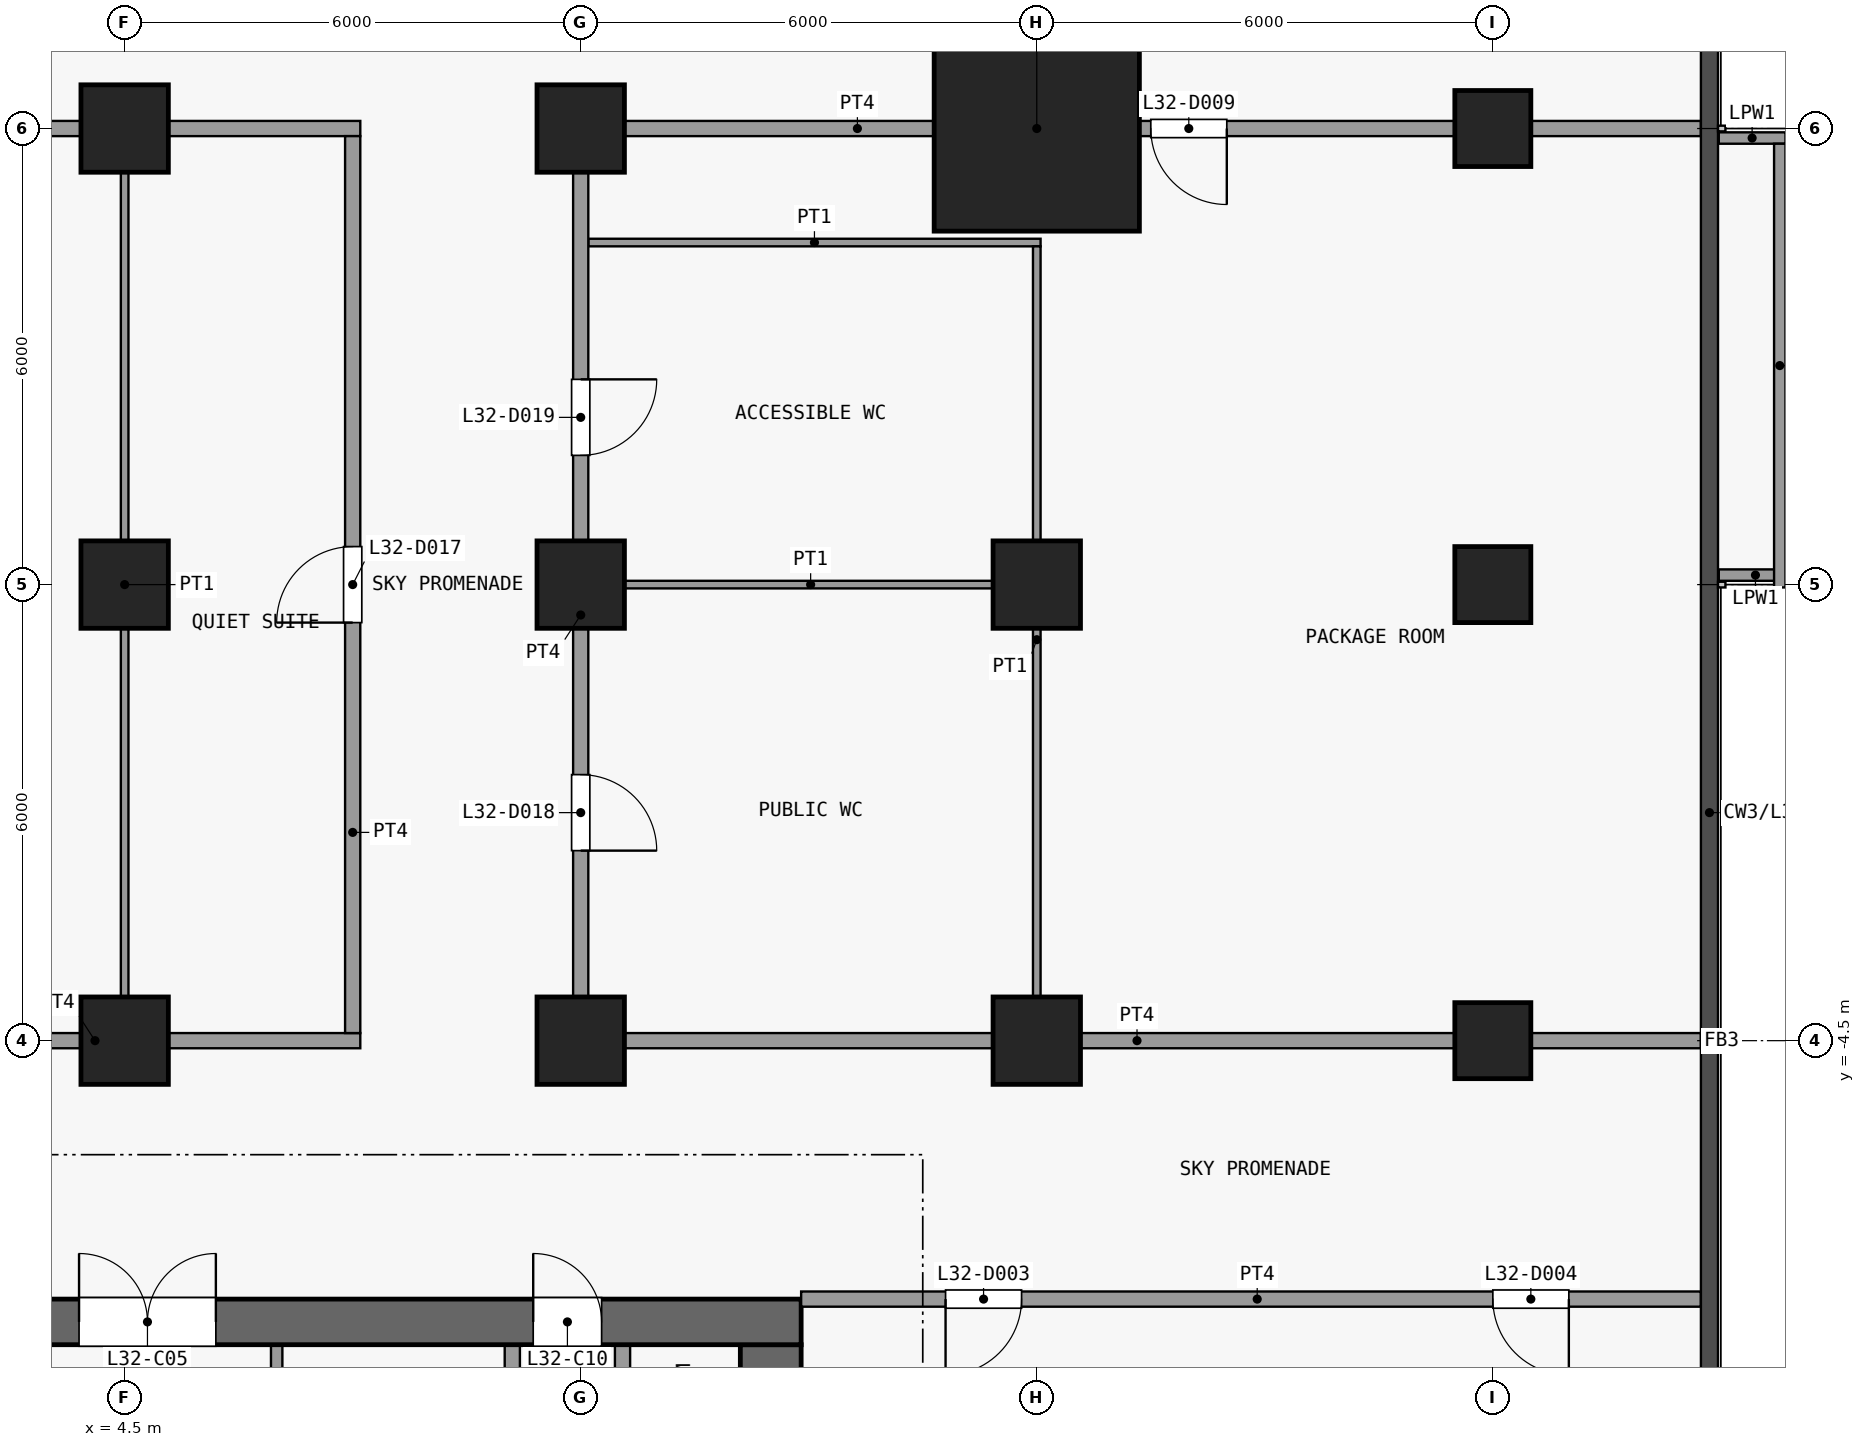
"""IFC4 building model, lengths in metres.
Left out: names, types, materials, properties, quantities, classifications, styles, units other than length and angle.
Written with IfcOpenShell. Run it as: python <this file> out.ifc"""

import sys

from ifc_helpers import new_model, si_unit, direction, frame, frame_2d, origin, origin_2d, place, context, subcontext, project, spatial, rectangle, extrude, element, fill, save


model = new_model("IFC4")
c1 = context("Model", 3, precision=1e-05, world=origin(), true_north=direction((0.0, 1.0)))
c2 = subcontext(c1, "Body", "Model", "MODEL_VIEW")
j1 = project(units=[si_unit("LENGTHUNIT", "METRE"), si_unit("PLANEANGLEUNIT", "RADIAN")], contexts=[c1])
p1 = place(None, origin())
s1 = spatial("IfcSite", under=j1, at=p1, CompositionType="ELEMENT")
p2 = place(p1, origin())
s2 = spatial("IfcBuilding", under=s1, at=p2, CompositionType="ELEMENT")
p3 = place(p2, frame((0.0, 0.0, 127.9)))
s3 = spatial("IfcBuildingStorey", under=s2, at=p3, CompositionType="ELEMENT", Elevation=127.9)
for number, where, z_axis, x_axis in (
    (1, (4.5, -4.5, 0.0), (0.0, 0.0, 1.0), (1.0, 0.0, 0.0)),
    (2, (4.5, 1.5, 0.0), (0.0, 0.0, 1.0), (1.0, 0.0, 0.0)),
    (3, (4.5, 7.5, 0.0), (0.0, 0.0, 1.0), (1.0, 0.0, 0.0)),
    (4, (10.5, -4.5, 0.0), (0.0, 0.0, 1.0), (1.0, 0.0, 0.0)),
    (5, (10.5, 1.5, 0.0), (0.0, 0.0, 1.0), (1.0, 0.0, 0.0)),
    (6, (10.5, 7.5, 0.0), (0.0, 0.0, 1.0), (1.0, 0.0, 0.0)),
    (7, (16.5, -4.5, 0.0), (0.0, 0.0, 1.0), (1.0, 0.0, 0.0)),
    (8, (16.5, 1.5, 0.0), (0.0, 0.0, 1.0), (1.0, 0.0, 0.0)),
):
    element("IfcColumn", number, at=place(p3, frame(where, z_axis=z_axis, x_axis=x_axis)), inside=s3, PredefinedType="COLUMN", context=c2, shape_type="SweptSolid", body=[
        extrude(rectangle(XDim=1.15, YDim=1.15, at=origin_2d()), origin(), (0.0, 0.0, 1.0), 6.0),
    ])
p4 = place(p3, frame((16.5, 7.5, 0.0), z_axis=(0.0, 0.0, 1.0), x_axis=(1.0, 0.0, 0.0)))
e9 = element("IfcColumn", 9, at=p4, inside=s3, PredefinedType="COLUMN", context=c2, shape_type="SweptSolid", body=[
    extrude(rectangle(XDim=2.7, YDim=2.7, at=origin_2d()), origin(), (0.0, 0.0, 1.0), 6.0),
])
for number, where, z_axis, x_axis in (
    (10, (22.5, -4.5, 0.0), (0.0, 0.0, 1.0), (1.0, 0.0, 0.0)),
    (11, (22.5, 1.5, 0.0), (0.0, 0.0, 1.0), (1.0, 0.0, 0.0)),
    (12, (22.5, 7.5, 0.0), (0.0, 0.0, 1.0), (1.0, 0.0, 0.0)),
):
    element("IfcColumn", number, at=place(p3, frame(where, z_axis=z_axis, x_axis=x_axis)), inside=s3, PredefinedType="COLUMN", context=c2, shape_type="SweptSolid", body=[
        extrude(rectangle(XDim=1.0, YDim=1.0, at=origin_2d()), origin(), (0.0, 0.0, 1.0), 6.0),
    ])
p5 = place(p3, frame((-13.4, -8.2, 0.0), z_axis=(0.0, 0.0, 1.0), x_axis=(1.0, 0.0, 0.0)))
e13 = element("IfcWall", 13, at=p5, inside=s3, PredefinedType="SHEAR", context=c2, shape_type="SweptSolid", body=[
    extrude(rectangle(XDim=26.8, YDim=0.6, at=frame_2d((13.4, 0.0))), origin(), (0.0, 0.0, 1.0), 5.7),
])
p6 = place(p5, frame((7.7, 0.0, 0.0)))
e14 = element("IfcOpeningElement", 14, at=p6, cuts=e13, PredefinedType="OPENING", context=c2, shape_type="SweptSolid", body=[
    extrude(rectangle(XDim=1.8, YDim=2.1, at=frame_2d((0.9, 1.05))), frame((0.0, 0.31, 0.0), z_axis=(0.0, -1.0, 0.0), x_axis=(1.0, 0.0, 0.0)), (0.0, 0.0, 1.0), 0.62),
])
p7 = place(p5, frame((17.3, 0.0, 0.0)))
e15 = element("IfcOpeningElement", 15, at=p7, cuts=e13, PredefinedType="OPENING", context=c2, shape_type="SweptSolid", body=[
    extrude(rectangle(XDim=1.8, YDim=2.1, at=frame_2d((0.9, 1.05))), frame((0.0, 0.31, 0.0), z_axis=(0.0, -1.0, 0.0), x_axis=(1.0, 0.0, 0.0)), (0.0, 0.0, 1.0), 0.62),
])
p8 = place(p5, frame((2.625, 0.0, 0.0)))
e16 = element("IfcOpeningElement", 16, at=p8, cuts=e13, PredefinedType="OPENING", context=c2, shape_type="SweptSolid", body=[
    extrude(rectangle(XDim=0.9, YDim=2.1, at=frame_2d((0.45, 1.05))), frame((0.0, 0.31, 0.0), z_axis=(0.0, -1.0, 0.0), x_axis=(1.0, 0.0, 0.0)), (0.0, 0.0, 1.0), 0.62),
])
p9 = place(p5, frame((23.275, 0.0, 0.0)))
e17 = element("IfcOpeningElement", 17, at=p9, cuts=e13, PredefinedType="OPENING", context=c2, shape_type="SweptSolid", body=[
    extrude(rectangle(XDim=0.9, YDim=2.1, at=frame_2d((0.45, 1.05))), frame((0.0, 0.31, 0.0), z_axis=(0.0, -1.0, 0.0), x_axis=(1.0, 0.0, 0.0)), (0.0, 0.0, 1.0), 0.62),
])
p10 = place(p3, frame((13.0, -24.6, 0.0), z_axis=(0.0, 0.0, 1.0), x_axis=(0.0, 1.0, 0.0)))
e18 = element("IfcWall", 18, at=p10, inside=s3, PredefinedType="SHEAR", context=c2, shape_type="SweptSolid", body=[
    extrude(rectangle(XDim=16.1, YDim=0.8, at=frame_2d((8.05, 0.0))), origin(), (0.0, 0.0, 1.0), 5.7),
])
p11 = place(p3, frame((6.5, -8.5, 0.0), z_axis=(0.0, 0.0, 1.0), x_axis=(0.0, -1.0, 0.0)))
e19 = element("IfcWall", 19, at=p11, inside=s3, PredefinedType="PARTITIONING", context=c2, shape_type="SweptSolid", body=[
    extrude(rectangle(XDim=10.85, YDim=0.15, at=frame_2d((5.425, 0.0))), origin(), (0.0, 0.0, 1.0), 5.7),
])
p12 = place(p11, frame((9.175, 0.0, 0.0)))
e20 = element("IfcOpeningElement", 20, at=p12, cuts=e19, PredefinedType="OPENING", context=c2, shape_type="SweptSolid", body=[
    extrude(rectangle(XDim=0.9, YDim=2.1, at=frame_2d((0.45, 1.05))), frame((0.0, 0.085, 0.0), z_axis=(0.0, -1.0, 0.0), x_axis=(1.0, 0.0, 0.0)), (0.0, 0.0, 1.0), 0.17),
])
p13 = place(p11, frame((3.525, 0.0, 0.0)))
e21 = element("IfcOpeningElement", 21, at=p13, cuts=e19, PredefinedType="OPENING", context=c2, shape_type="SweptSolid", body=[
    extrude(rectangle(XDim=1.2, YDim=2.1, at=frame_2d((0.6, 1.05))), frame((0.0, 0.085, 0.0), z_axis=(0.0, -1.0, 0.0), x_axis=(1.0, 0.0, 0.0)), (0.0, 0.0, 1.0), 0.17),
])
p14 = place(p3, frame((9.6, -16.9, 0.0), z_axis=(0.0, 0.0, 1.0), x_axis=(0.0, 1.0, 0.0)))
e22 = element("IfcWall", 22, at=p14, inside=s3, PredefinedType="PARTITIONING", context=c2, shape_type="SweptSolid", body=[
    extrude(rectangle(XDim=8.4, YDim=0.2, at=frame_2d((4.2, 0.0))), origin(), (0.0, 0.0, 1.0), 5.7),
])
p15 = place(p3, frame((11.05, -8.5, 0.0), z_axis=(0.0, 0.0, 1.0), x_axis=(0.0, -1.0, 0.0)))
e23 = element("IfcWall", 23, at=p15, inside=s3, PredefinedType="PARTITIONING", context=c2, shape_type="SweptSolid", body=[
    extrude(rectangle(XDim=3.6, YDim=0.2, at=frame_2d((1.8, 0.0))), origin(), (0.0, 0.0, 1.0), 5.7),
])
p16 = place(p15, frame((1.3, 0.0, 0.0)))
e24 = element("IfcOpeningElement", 24, at=p16, cuts=e23, PredefinedType="OPENING", context=c2, shape_type="SweptSolid", body=[
    extrude(rectangle(XDim=0.9, YDim=2.1, at=frame_2d((0.45, 1.05))), frame((0.0, 0.11, 0.0), z_axis=(0.0, -1.0, 0.0), x_axis=(1.0, 0.0, 0.0)), (0.0, 0.0, 1.0), 0.22),
])
p17 = place(p3, frame((26.438, 1.625, 0.0), z_axis=(0.0, 0.0, 1.0), x_axis=(-1.0, 0.0, 0.0)))
e25 = element("IfcWall", 25, at=p17, inside=s3, PredefinedType="PARAPET", context=c2, shape_type="SweptSolid", body=[
    extrude(rectangle(XDim=0.965, YDim=0.15, at=frame_2d((0.482, 0.0))), origin(), (0.0, 0.0, 1.0), 1.15),
])
p18 = place(p3, frame((25.472, 7.375, 0.0), z_axis=(0.0, 0.0, 1.0), x_axis=(1.0, 0.0, 0.0)))
e26 = element("IfcWall", 26, at=p18, inside=s3, PredefinedType="PARAPET", context=c2, shape_type="SweptSolid", body=[
    extrude(rectangle(XDim=0.878, YDim=0.15, at=frame_2d((0.439, 0.0))), origin(), (0.0, 0.0, 1.0), 1.15),
])
p19 = place(p3, frame((26.275, 7.3, 0.0), z_axis=(0.0, 0.0, 1.0), x_axis=(0.0, -1.0, 0.0)))
e27 = element("IfcWall", 27, at=p19, inside=s3, PredefinedType="PARAPET", context=c2, shape_type="SweptSolid", body=[
    extrude(rectangle(XDim=5.838, YDim=0.15, at=frame_2d((2.919, 0.0))), origin(), (0.0, 0.0, 1.0), 1.15),
])
p20 = place(p3, frame((13.4, -7.9, 0.0), z_axis=(0.0, 0.0, 1.0), x_axis=(1.0, 0.0, 0.0)))
e28 = element("IfcWall", 28, at=p20, inside=s3, PredefinedType="PARTITIONING", context=c2, shape_type="SweptSolid", body=[
    extrude(rectangle(XDim=11.838, YDim=0.2, at=frame_2d((5.919, 0.0))), origin(), (0.0, 0.0, 1.0), 5.7),
])
p21 = place(p20, frame((1.9, 0.0, 0.0)))
e29 = element("IfcOpeningElement", 29, at=p21, cuts=e28, PredefinedType="OPENING", context=c2, shape_type="SweptSolid", body=[
    extrude(rectangle(XDim=1.0, YDim=2.1, at=frame_2d((0.5, 1.05))), frame((0.0, 0.11, 0.0), z_axis=(0.0, -1.0, 0.0), x_axis=(1.0, 0.0, 0.0)), (0.0, 0.0, 1.0), 0.22),
])
p22 = place(p20, frame((9.1, 0.0, 0.0)))
e30 = element("IfcOpeningElement", 30, at=p22, cuts=e28, PredefinedType="OPENING", context=c2, shape_type="SweptSolid", body=[
    extrude(rectangle(XDim=1.0, YDim=2.1, at=frame_2d((0.5, 1.05))), frame((0.0, 0.11, 0.0), z_axis=(0.0, -1.0, 0.0), x_axis=(1.0, 0.0, 0.0)), (0.0, 0.0, 1.0), 0.22),
])
p23 = place(p3, frame((-7.6, -4.5, 0.0), z_axis=(0.0, 0.0, 1.0), x_axis=(1.0, 0.0, 0.0)))
e31 = element("IfcWall", 31, at=p23, inside=s3, PredefinedType="PARTITIONING", context=c2, shape_type="SweptSolid", body=[
    extrude(rectangle(XDim=15.2, YDim=0.2, at=frame_2d((7.6, 0.0))), origin(), (0.0, 0.0, 1.0), 5.7),
])
p24 = place(p23, frame((7.1, 0.0, 0.0)))
e32 = element("IfcOpeningElement", 32, at=p24, cuts=e31, PredefinedType="OPENING", context=c2, shape_type="SweptSolid", body=[
    extrude(rectangle(XDim=1.0, YDim=2.1, at=frame_2d((0.5, 1.05))), frame((0.0, 0.11, 0.0), z_axis=(0.0, -1.0, 0.0), x_axis=(1.0, 0.0, 0.0)), (0.0, 0.0, 1.0), 0.22),
])
p25 = place(p3, frame((10.4, -4.5, 0.0), z_axis=(0.0, 0.0, 1.0), x_axis=(1.0, 0.0, 0.0)))
e33 = element("IfcWall", 33, at=p25, inside=s3, PredefinedType="PARTITIONING", context=c2, shape_type="SweptSolid", body=[
    extrude(rectangle(XDim=14.838, YDim=0.2, at=frame_2d((7.419, 0.0))), origin(), (0.0, 0.0, 1.0), 5.7),
])
p26 = place(p3, frame((10.6, 1.5, 0.0), z_axis=(0.0, 0.0, 1.0), x_axis=(1.0, 0.0, 0.0)))
e34 = element("IfcWall", 34, at=p26, inside=s3, PredefinedType="PARTITIONING", context=c2, shape_type="SweptSolid", body=[
    extrude(rectangle(XDim=5.85, YDim=0.1, at=frame_2d((2.925, 0.0))), origin(), (0.0, 0.0, 1.0), 5.7),
])
p27 = place(p3, frame((10.6, 6.0, 0.0), z_axis=(0.0, 0.0, 1.0), x_axis=(1.0, 0.0, 0.0)))
e35 = element("IfcWall", 35, at=p27, inside=s3, PredefinedType="PARTITIONING", context=c2, shape_type="SweptSolid", body=[
    extrude(rectangle(XDim=5.95, YDim=0.1, at=frame_2d((2.975, 0.0))), origin(), (0.0, 0.0, 1.0), 5.7),
])
p28 = place(p3, frame((-7.6, 7.5, 0.0), z_axis=(0.0, 0.0, 1.0), x_axis=(1.0, 0.0, 0.0)))
e36 = element("IfcWall", 36, at=p28, inside=s3, PredefinedType="PARTITIONING", context=c2, shape_type="SweptSolid", body=[
    extrude(rectangle(XDim=15.2, YDim=0.2, at=frame_2d((7.6, 0.0))), origin(), (0.0, 0.0, 1.0), 5.7),
])
p29 = place(p3, frame((10.4, 7.5, 0.0), z_axis=(0.0, 0.0, 1.0), x_axis=(1.0, 0.0, 0.0)))
e37 = element("IfcWall", 37, at=p29, inside=s3, PredefinedType="PARTITIONING", context=c2, shape_type="SweptSolid", body=[
    extrude(rectangle(XDim=14.838, YDim=0.2, at=frame_2d((7.419, 0.0))), origin(), (0.0, 0.0, 1.0), 5.7),
])
p30 = place(p29, frame((7.6, 0.0, 0.0)))
e38 = element("IfcOpeningElement", 38, at=p30, cuts=e37, PredefinedType="OPENING", context=c2, shape_type="SweptSolid", body=[
    extrude(rectangle(XDim=1.0, YDim=2.1, at=frame_2d((0.5, 1.05))), frame((0.0, 0.11, 0.0), z_axis=(0.0, -1.0, 0.0), x_axis=(1.0, 0.0, 0.0)), (0.0, 0.0, 1.0), 0.22),
])
p31 = place(p3, frame((4.5, -4.4, 0.0), z_axis=(0.0, 0.0, 1.0), x_axis=(0.0, 1.0, 0.0)))
e39 = element("IfcWall", 39, at=p31, inside=s3, PredefinedType="PARTITIONING", context=c2, shape_type="SweptSolid", body=[
    extrude(rectangle(XDim=11.8, YDim=0.1, at=frame_2d((5.9, 0.0))), origin(), (0.0, 0.0, 1.0), 5.7),
])
p32 = place(p3, frame((7.5, -4.4, 0.0), z_axis=(0.0, 0.0, 1.0), x_axis=(0.0, 1.0, 0.0)))
e40 = element("IfcWall", 40, at=p32, inside=s3, PredefinedType="PARTITIONING", context=c2, shape_type="SweptSolid", body=[
    extrude(rectangle(XDim=11.8, YDim=0.2, at=frame_2d((5.9, 0.0))), origin(), (0.0, 0.0, 1.0), 5.7),
])
p33 = place(p32, frame((5.4, 0.0, 0.0)))
e41 = element("IfcOpeningElement", 41, at=p33, cuts=e40, PredefinedType="OPENING", context=c2, shape_type="SweptSolid", body=[
    extrude(rectangle(XDim=1.0, YDim=2.1, at=frame_2d((0.5, 1.05))), frame((0.0, 0.11, 0.0), z_axis=(0.0, -1.0, 0.0), x_axis=(1.0, 0.0, 0.0)), (0.0, 0.0, 1.0), 0.22),
])
p34 = place(p3, frame((10.5, -4.4, 0.0), z_axis=(0.0, 0.0, 1.0), x_axis=(0.0, 1.0, 0.0)))
e42 = element("IfcWall", 42, at=p34, inside=s3, PredefinedType="PARTITIONING", context=c2, shape_type="SweptSolid", body=[
    extrude(rectangle(XDim=11.8, YDim=0.2, at=frame_2d((5.9, 0.0))), origin(), (0.0, 0.0, 1.0), 5.7),
])
p35 = place(p34, frame((2.4, 0.0, 0.0)))
e43 = element("IfcOpeningElement", 43, at=p35, cuts=e42, PredefinedType="OPENING", context=c2, shape_type="SweptSolid", body=[
    extrude(rectangle(XDim=1.0, YDim=2.1, at=frame_2d((0.5, 1.05))), frame((0.0, 0.11, 0.0), z_axis=(0.0, -1.0, 0.0), x_axis=(1.0, 0.0, 0.0)), (0.0, 0.0, 1.0), 0.22),
])
p36 = place(p34, frame((7.6, 0.0, 0.0)))
e44 = element("IfcOpeningElement", 44, at=p36, cuts=e42, PredefinedType="OPENING", context=c2, shape_type="SweptSolid", body=[
    extrude(rectangle(XDim=1.0, YDim=2.1, at=frame_2d((0.5, 1.05))), frame((0.0, 0.11, 0.0), z_axis=(0.0, -1.0, 0.0), x_axis=(1.0, 0.0, 0.0)), (0.0, 0.0, 1.0), 0.22),
])
p37 = place(p3, frame((16.5, -4.4, 0.0), z_axis=(0.0, 0.0, 1.0), x_axis=(0.0, 1.0, 0.0)))
e45 = element("IfcWall", 45, at=p37, inside=s3, PredefinedType="PARTITIONING", context=c2, shape_type="SweptSolid", body=[
    extrude(rectangle(XDim=10.35, YDim=0.1, at=frame_2d((5.175, 0.0))), origin(), (0.0, 0.0, 1.0), 5.7),
])
p38 = place(p7, origin())
e46 = element("IfcDoor", 46, at=p38, inside=s3, OperationType="DOUBLE_DOOR_SINGLE_SWING", PredefinedType="DOOR", context=c2, shape_type="SweptSolid", body=[
    extrude(rectangle(XDim=1.8, YDim=2.1, at=frame_2d((0.9, 1.05))), frame((0.0, 0.025, 0.0), z_axis=(0.0, -1.0, 0.0), x_axis=(1.0, 0.0, 0.0)), (0.0, 0.0, 1.0), 0.05),
])
fill(e15, e46)
p39 = place(p9, origin())
e47 = element("IfcDoor", 47, at=p39, inside=s3, OperationType="SINGLE_SWING_LEFT", PredefinedType="DOOR", context=c2, shape_type="SweptSolid", body=[
    extrude(rectangle(XDim=0.9, YDim=2.1, at=frame_2d((0.45, 1.05))), frame((0.0, 0.025, 0.0), z_axis=(0.0, -1.0, 0.0), x_axis=(1.0, 0.0, 0.0)), (0.0, 0.0, 1.0), 0.05),
])
fill(e17, e47)
p40 = place(p21, origin())
e48 = element("IfcDoor", 48, at=p40, inside=s3, OperationType="SINGLE_SWING_LEFT", PredefinedType="DOOR", context=c2, shape_type="SweptSolid", body=[
    extrude(rectangle(XDim=1.0, YDim=2.1, at=frame_2d((0.5, 1.05))), frame((0.0, 0.025, 0.0), z_axis=(0.0, -1.0, 0.0), x_axis=(1.0, 0.0, 0.0)), (0.0, 0.0, 1.0), 0.05),
])
fill(e29, e48)
p41 = place(p22, origin())
e49 = element("IfcDoor", 49, at=p41, inside=s3, OperationType="SINGLE_SWING_RIGHT", PredefinedType="DOOR", context=c2, shape_type="SweptSolid", body=[
    extrude(rectangle(XDim=1.0, YDim=2.1, at=frame_2d((0.5, 1.05))), frame((0.0, 0.025, 0.0), z_axis=(0.0, -1.0, 0.0), x_axis=(1.0, 0.0, 0.0)), (0.0, 0.0, 1.0), 0.05),
])
fill(e30, e49)
p42 = place(p30, origin())
e50 = element("IfcDoor", 50, at=p42, inside=s3, OperationType="SINGLE_SWING_RIGHT", PredefinedType="DOOR", context=c2, shape_type="SweptSolid", body=[
    extrude(rectangle(XDim=1.0, YDim=2.1, at=frame_2d((0.5, 1.05))), frame((0.0, 0.025, 0.0), z_axis=(0.0, -1.0, 0.0), x_axis=(1.0, 0.0, 0.0)), (0.0, 0.0, 1.0), 0.05),
])
fill(e38, e50)
p43 = place(p33, origin())
e51 = element("IfcDoor", 51, at=p43, inside=s3, OperationType="SINGLE_SWING_RIGHT", PredefinedType="DOOR", context=c2, shape_type="SweptSolid", body=[
    extrude(rectangle(XDim=1.0, YDim=2.1, at=frame_2d((0.5, 1.05))), frame((0.0, 0.025, 0.0), z_axis=(0.0, -1.0, 0.0), x_axis=(1.0, 0.0, 0.0)), (0.0, 0.0, 1.0), 0.05),
])
fill(e41, e51)
p44 = place(p35, origin())
e52 = element("IfcDoor", 52, at=p44, inside=s3, OperationType="SINGLE_SWING_LEFT", PredefinedType="DOOR", context=c2, shape_type="SweptSolid", body=[
    extrude(rectangle(XDim=1.0, YDim=2.1, at=frame_2d((0.5, 1.05))), frame((0.0, 0.025, 0.0), z_axis=(0.0, -1.0, 0.0), x_axis=(1.0, 0.0, 0.0)), (0.0, 0.0, 1.0), 0.05),
])
fill(e43, e52)
p45 = place(p36, origin())
e53 = element("IfcDoor", 53, at=p45, inside=s3, OperationType="SINGLE_SWING_RIGHT", PredefinedType="DOOR", context=c2, shape_type="SweptSolid", body=[
    extrude(rectangle(XDim=1.0, YDim=2.1, at=frame_2d((0.5, 1.05))), frame((0.0, 0.025, 0.0), z_axis=(0.0, -1.0, 0.0), x_axis=(1.0, 0.0, 0.0)), (0.0, 0.0, 1.0), 0.05),
])
fill(e44, e53)
save(model, sys.argv[1])
